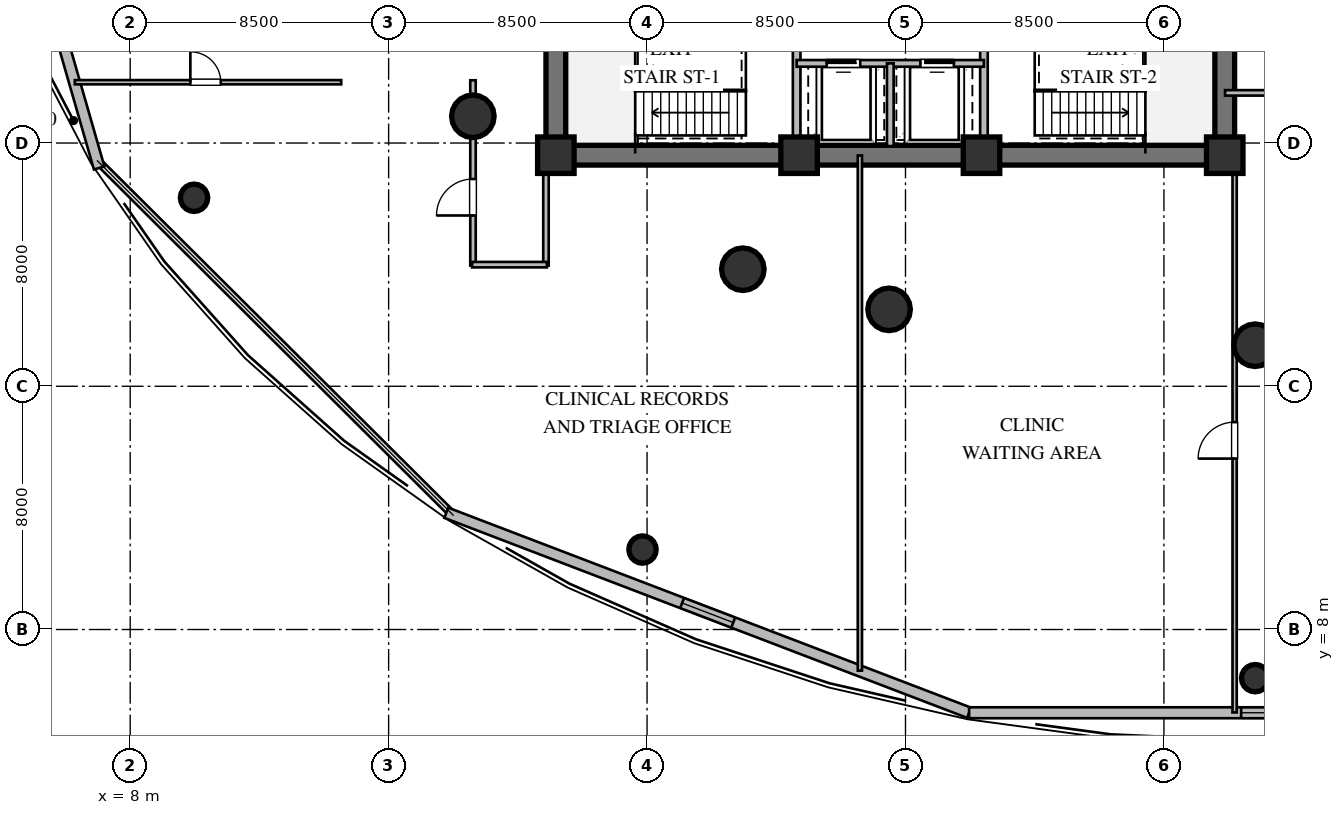
"""IFC4 building model, lengths in metres.
Left out: names, types, materials, properties, quantities, classifications, styles, units other than length and angle.
Written with IfcOpenShell. Run it as: python <this file> out.ifc"""

import sys

from ifc_helpers import new_model, si_unit, direction, frame, frame_2d, origin, origin_2d, place, context, subcontext, project, spatial, rectangle, circle, extrude, element, fill, save


model = new_model("IFC4")
c1 = context("Model", 3, precision=1e-05, world=origin(), true_north=direction((0.0, 1.0)))
c2 = subcontext(c1, "Body", "Model", "MODEL_VIEW")
j1 = project(units=[si_unit("LENGTHUNIT", "METRE"), si_unit("PLANEANGLEUNIT", "RADIAN")], contexts=[c1])
p1 = place(None, origin())
s1 = spatial("IfcSite", under=j1, at=p1, CompositionType="ELEMENT")
p2 = place(p1, origin())
s2 = spatial("IfcBuilding", under=s1, at=p2, CompositionType="ELEMENT")
p3 = place(p2, frame((0.0, 0.0, 9.6)))
s3 = spatial("IfcBuildingStorey", under=s2, at=p3, CompositionType="ELEMENT", Elevation=9.6)
p4 = place(p3, frame((21.675, 23.6, 0.0), z_axis=(0.0, 0.0, 1.0), x_axis=(1.0, 0.0, 0.0)))
e1 = element("IfcWall", 1, at=p4, inside=s3, PredefinedType="SHEAR", context=c2, shape_type="SweptSolid", body=[
    extrude(rectangle(XDim=22.65, YDim=0.65, at=frame_2d((11.325, 0.0))), origin(), (0.0, 0.0, 1.0), 4.52),
])
p5 = place(p3, frame((22.0, 23.925, 0.0), z_axis=(0.0, 0.0, 1.0), x_axis=(0.0, 1.0, 0.0)))
e2 = element("IfcWall", 2, at=p5, inside=s3, PredefinedType="SHEAR", context=c2, shape_type="SweptSolid", body=[
    extrude(rectangle(XDim=12.15, YDim=0.65, at=frame_2d((6.075, 0.0))), origin(), (0.0, 0.0, 1.0), 4.52),
])
p6 = place(p3, frame((44.0, 23.925, 0.0), z_axis=(0.0, 0.0, 1.0), x_axis=(0.0, 1.0, 0.0)))
e3 = element("IfcWall", 3, at=p6, inside=s3, PredefinedType="SHEAR", context=c2, shape_type="SweptSolid", body=[
    extrude(rectangle(XDim=12.15, YDim=0.65, at=frame_2d((6.075, 0.0))), origin(), (0.0, 0.0, 1.0), 4.52),
])
p7 = place(p6, frame((8.775, 0.0, 0.0)))
e4 = element("IfcOpeningElement", 4, at=p7, cuts=e3, PredefinedType="OPENING", context=c2, shape_type="SweptSolid", body=[
    extrude(rectangle(XDim=1.5, YDim=2.15, at=frame_2d((0.75, 1.075))), frame((0.0, 0.335, 0.0), z_axis=(0.0, -1.0, 0.0), x_axis=(1.0, 0.0, 0.0)), (0.0, 0.0, 1.0), 0.67),
])
for number, where, z_axis, x_axis in (
    (5, (22.0, 23.6, 0.0), (0.0, 0.0, 1.0), (1.0, 0.0, 0.0)),
    (6, (30.0, 23.6, 0.0), (0.0, 0.0, 1.0), (1.0, 0.0, 0.0)),
    (7, (36.0, 23.6, 0.0), (0.0, 0.0, 1.0), (1.0, 0.0, 0.0)),
    (8, (44.0, 23.6, 0.0), (0.0, 0.0, 1.0), (1.0, 0.0, 0.0)),
):
    element("IfcColumn", number, at=place(p3, frame(where, z_axis=z_axis, x_axis=x_axis)), inside=s3, PredefinedType="COLUMN", context=c2, shape_type="SweptSolid", body=[
        extrude(rectangle(XDim=1.2, YDim=1.2, at=origin_2d()), origin(), (0.0, 0.0, 1.0), 4.8),
    ])
for number, where, z_axis, x_axis in (
    (9, (19.27, 24.88, 0.0), (0.0, 0.0, 1.0), (1.0, 0.0, 0.0)),
    (10, (28.15, 19.85, 0.0), (0.0, 0.0, 1.0), (1.0, 0.0, 0.0)),
    (11, (32.96, 18.53, 0.0), (0.0, 0.0, 1.0), (1.0, 0.0, 0.0)),
    (12, (45.0, 17.35, 0.0), (0.0, 0.0, 1.0), (1.0, 0.0, 0.0)),
):
    element("IfcColumn", number, at=place(p3, frame(where, z_axis=z_axis, x_axis=x_axis)), inside=s3, PredefinedType="COLUMN", context=c2, shape_type="SweptSolid", body=[
        extrude(circle(Radius=0.7, at=origin_2d()), origin(), (0.0, 0.0, 1.0), 4.8),
    ])
for number, where, z_axis, x_axis in (
    (13, (10.1, 22.2, 0.0), (0.0, 0.0, 1.0), (1.0, 0.0, 0.0)),
    (14, (24.85, 10.63, 0.0), (0.0, 0.0, 1.0), (1.0, 0.0, 0.0)),
    (15, (45.0, 6.4, 0.0), (0.0, 0.0, 1.0), (1.0, 0.0, 0.0)),
):
    element("IfcColumn", number, at=place(p3, frame(where, z_axis=z_axis, x_axis=x_axis)), inside=s3, PredefinedType="COLUMN", context=c2, shape_type="SweptSolid", body=[
        extrude(circle(Radius=0.45, at=origin_2d()), origin(), (0.0, 0.0, 1.0), 4.8),
    ])
p8 = place(p3, frame((2.72, 38.0, 0.0), z_axis=(0.0, 0.0, 1.0), x_axis=(0.276203409751, -0.961099202186, 0.0)))
e16 = element("IfcWall", 16, at=p8, inside=s3, PredefinedType="STANDARD", context=c2, shape_type="SweptSolid", body=[
    extrude(rectangle(XDim=15.42, YDim=0.36, at=frame_2d((7.71, 0.0))), origin(), (0.0, 0.0, 1.0), 4.52),
])
p9 = place(p8, frame((6.81, 0.0, 1.05)))
e17 = element("IfcOpeningElement", 17, at=p9, cuts=e16, PredefinedType="OPENING", context=c2, shape_type="SweptSolid", body=[
    extrude(rectangle(XDim=1.8, YDim=1.7, at=frame_2d((0.9, 0.85))), frame((0.0, 0.19, 0.0), z_axis=(0.0, -1.0, 0.0), x_axis=(1.0, 0.0, 0.0)), (0.0, 0.0, 1.0), 0.38),
])
p10 = place(p3, frame((18.396, 11.839, 0.0), z_axis=(0.0, 0.0, 1.0), x_axis=(0.934012147289, -0.357241247221, 0.0)))
e18 = element("IfcWall", 18, at=p10, inside=s3, PredefinedType="STANDARD", context=c2, shape_type="SweptSolid", body=[
    extrude(rectangle(XDim=18.411, YDim=0.36, at=frame_2d((9.206, 0.0))), origin(), (0.0, 0.0, 1.0), 4.52),
])
p11 = place(p10, frame((8.305, 0.0, 1.05)))
e19 = element("IfcOpeningElement", 19, at=p11, cuts=e18, PredefinedType="OPENING", context=c2, shape_type="SweptSolid", body=[
    extrude(rectangle(XDim=1.8, YDim=1.7, at=frame_2d((0.9, 0.85))), frame((0.0, 0.19, 0.0), z_axis=(0.0, -1.0, 0.0), x_axis=(1.0, 0.0, 0.0)), (0.0, 0.0, 1.0), 0.38),
])
p12 = place(p3, frame((35.592, 5.262, 0.0), z_axis=(0.0, 0.0, 1.0), x_axis=(1.0, 0.0, 0.0)))
e20 = element("IfcWall", 20, at=p12, inside=s3, PredefinedType="STANDARD", context=c2, shape_type="SweptSolid", body=[
    extrude(rectangle(XDim=18.816, YDim=0.36, at=frame_2d((9.408, 0.0))), origin(), (0.0, 0.0, 1.0), 4.52),
])
p13 = place(p12, frame((8.948, 0.0, 1.05)))
e21 = element("IfcOpeningElement", 21, at=p13, cuts=e20, PredefinedType="OPENING", context=c2, shape_type="SweptSolid", body=[
    extrude(rectangle(XDim=1.8, YDim=1.7, at=frame_2d((0.9, 0.85))), frame((0.0, 0.19, 0.0), z_axis=(0.0, -1.0, 0.0), x_axis=(1.0, 0.0, 0.0)), (0.0, 0.0, 1.0), 0.38),
])
p14 = place(p3, frame((29.92, 23.9, 0.0), z_axis=(0.0, 0.0, 1.0), x_axis=(0.0, 1.0, 0.0)))
e22 = element("IfcWall", 22, at=p14, inside=s3, PredefinedType="SOLIDWALL", context=c2, shape_type="SweptSolid", body=[
    extrude(rectangle(XDim=5.4, YDim=0.25, at=frame_2d((2.7, 0.0))), origin(), (0.0, 0.0, 1.0), 4.52),
])
p15 = place(p14, frame((3.421, 0.0, 0.0)))
e23 = element("IfcOpeningElement", 23, at=p15, cuts=e22, PredefinedType="OPENING", context=c2, shape_type="SweptSolid", body=[
    extrude(rectangle(XDim=1.15, YDim=2.1, at=frame_2d((0.575, 1.05))), frame((0.0, 0.135, 0.0), z_axis=(0.0, -1.0, 0.0), x_axis=(1.0, 0.0, 0.0)), (0.0, 0.0, 1.0), 0.27),
])
p16 = place(p3, frame((36.08, 23.9, 0.0), z_axis=(0.0, 0.0, 1.0), x_axis=(0.0, 1.0, 0.0)))
e24 = element("IfcWall", 24, at=p16, inside=s3, PredefinedType="SOLIDWALL", context=c2, shape_type="SweptSolid", body=[
    extrude(rectangle(XDim=5.4, YDim=0.25, at=frame_2d((2.7, 0.0))), origin(), (0.0, 0.0, 1.0), 4.52),
])
p17 = place(p16, frame((3.421, 0.0, 0.0)))
e25 = element("IfcOpeningElement", 25, at=p17, cuts=e24, PredefinedType="OPENING", context=c2, shape_type="SweptSolid", body=[
    extrude(rectangle(XDim=1.15, YDim=2.1, at=frame_2d((0.575, 1.05))), frame((0.0, 0.135, 0.0), z_axis=(0.0, -1.0, 0.0), x_axis=(1.0, 0.0, 0.0)), (0.0, 0.0, 1.0), 0.27),
])
p18 = place(p3, frame((29.92, 26.62, 0.0), z_axis=(0.0, 0.0, 1.0), x_axis=(1.0, 0.0, 0.0)))
e26 = element("IfcWall", 26, at=p18, inside=s3, PredefinedType="SOLIDWALL", context=c2, shape_type="SweptSolid", body=[
    extrude(rectangle(XDim=6.16, YDim=0.22, at=frame_2d((3.08, 0.0))), origin(), (0.0, 0.0, 1.0), 4.52),
])
p19 = place(p18, frame((0.99, 0.0, 0.0)))
e27 = element("IfcOpeningElement", 27, at=p19, cuts=e26, PredefinedType="OPENING", context=c2, shape_type="SweptSolid", body=[
    extrude(rectangle(XDim=1.1, YDim=2.1, at=frame_2d((0.55, 1.05))), frame((0.0, 0.12, 0.0), z_axis=(0.0, -1.0, 0.0), x_axis=(1.0, 0.0, 0.0)), (0.0, 0.0, 1.0), 0.24),
])
p20 = place(p18, frame((4.07, 0.0, 0.0)))
e28 = element("IfcOpeningElement", 28, at=p20, cuts=e26, PredefinedType="OPENING", context=c2, shape_type="SweptSolid", body=[
    extrude(rectangle(XDim=1.1, YDim=2.1, at=frame_2d((0.55, 1.05))), frame((0.0, 0.12, 0.0), z_axis=(0.0, -1.0, 0.0), x_axis=(1.0, 0.0, 0.0)), (0.0, 0.0, 1.0), 0.24),
])
p21 = place(p3, frame((33.0, 23.9, 0.0), z_axis=(0.0, 0.0, 1.0), x_axis=(0.0, 1.0, 0.0)))
e29 = element("IfcWall", 29, at=p21, inside=s3, PredefinedType="SOLIDWALL", context=c2, shape_type="SweptSolid", body=[
    extrude(rectangle(XDim=2.72, YDim=0.22, at=frame_2d((1.36, 0.0))), origin(), (0.0, 0.0, 1.0), 4.52),
])
p22 = place(p3, frame((62.415, 25.65, 0.0), z_axis=(0.0, 0.0, 1.0), x_axis=(-1.0, 0.0, 0.0)))
e30 = element("IfcWall", 30, at=p22, inside=s3, PredefinedType="PARTITIONING", context=c2, shape_type="SweptSolid", body=[
    extrude(rectangle(XDim=18.405, YDim=0.18, at=frame_2d((9.203, 0.0))), origin(), (0.0, 0.0, 1.0), 3.966),
])
p23 = place(p22, frame((8.46, 0.0, 0.0)))
e31 = element("IfcOpeningElement", 31, at=p23, cuts=e30, PredefinedType="OPENING", context=c2, shape_type="SweptSolid", body=[
    extrude(rectangle(XDim=1.2, YDim=2.15, at=frame_2d((0.6, 1.075))), frame((0.0, 0.1, 0.0), z_axis=(0.0, -1.0, 0.0), x_axis=(1.0, 0.0, 0.0)), (0.0, 0.0, 1.0), 0.2),
])
p24 = place(p3, frame((19.275, 19.97, 0.0), z_axis=(0.0, 0.0, 1.0), x_axis=(0.0, 1.0, 0.0)))
e32 = element("IfcWall", 32, at=p24, inside=s3, PredefinedType="PARTITIONING", context=c2, shape_type="SweptSolid", body=[
    extrude(rectangle(XDim=6.095, YDim=0.18, at=frame_2d((3.047, 0.0))), origin(), (0.0, 0.0, 1.0), 3.898),
])
p25 = place(p24, frame((1.647, 0.0, 0.0)))
e33 = element("IfcOpeningElement", 33, at=p25, cuts=e32, PredefinedType="OPENING", context=c2, shape_type="SweptSolid", body=[
    extrude(rectangle(XDim=1.2, YDim=2.15, at=frame_2d((0.6, 1.075))), frame((0.0, 0.1, 0.0), z_axis=(0.0, -1.0, 0.0), x_axis=(1.0, 0.0, 0.0)), (0.0, 0.0, 1.0), 0.2),
])
p26 = place(p3, frame((21.675, 23.59, 0.0), z_axis=(0.0, 0.0, 1.0), x_axis=(0.0, -1.0, 0.0)))
e34 = element("IfcWall", 34, at=p26, inside=s3, PredefinedType="PARTITIONING", context=c2, shape_type="SweptSolid", body=[
    extrude(rectangle(XDim=3.62, YDim=0.18, at=frame_2d((1.81, 0.0))), origin(), (0.0, 0.0, 1.0), 3.66),
])
p27 = place(p3, frame((21.705, 20.0, 0.0), z_axis=(0.0, 0.0, 1.0), x_axis=(-1.0, 0.0, 0.0)))
e35 = element("IfcWall", 35, at=p27, inside=s3, PredefinedType="PARTITIONING", context=c2, shape_type="SweptSolid", body=[
    extrude(rectangle(XDim=2.46, YDim=0.18, at=frame_2d((1.23, 0.0))), origin(), (0.0, 0.0, 1.0), 4.52),
])
p28 = place(p3, frame((44.325, 5.272, 0.0), z_axis=(0.0, 0.0, 1.0), x_axis=(0.0, 1.0, 0.0)))
e36 = element("IfcWall", 36, at=p28, inside=s3, PredefinedType="PARTITIONING", context=c2, shape_type="SweptSolid", body=[
    extrude(rectangle(XDim=18.318, YDim=0.14, at=frame_2d((9.159, 0.0))), origin(), (0.0, 0.0, 1.0), 3.66),
])
p29 = place(p28, frame((8.349, 0.0, 0.0)))
e37 = element("IfcOpeningElement", 37, at=p29, cuts=e36, PredefinedType="OPENING", context=c2, shape_type="SweptSolid", body=[
    extrude(rectangle(XDim=1.2, YDim=2.15, at=frame_2d((0.6, 1.075))), frame((0.0, 0.08, 0.0), z_axis=(0.0, -1.0, 0.0), x_axis=(1.0, 0.0, 0.0)), (0.0, 0.0, 1.0), 0.16),
])
p30 = place(p3, frame((6.179, 26.0, 0.0), z_axis=(0.0, 0.0, 1.0), x_axis=(1.0, 0.0, 0.0)))
e38 = element("IfcWall", 38, at=p30, inside=s3, PredefinedType="PARTITIONING", context=c2, shape_type="SweptSolid", body=[
    extrude(rectangle(XDim=8.761, YDim=0.14, at=frame_2d((4.381, 0.0))), origin(), (0.0, 0.0, 1.0), 4.52),
])
p31 = place(p30, frame((3.8, 0.0, 0.0)))
e39 = element("IfcOpeningElement", 39, at=p31, cuts=e38, PredefinedType="OPENING", context=c2, shape_type="SweptSolid", body=[
    extrude(rectangle(XDim=1.0, YDim=2.1, at=frame_2d((0.5, 1.05))), frame((0.0, 0.08, 0.0), z_axis=(0.0, -1.0, 0.0), x_axis=(1.0, 0.0, 0.0)), (0.0, 0.0, 1.0), 0.16),
])
p32 = place(p3, frame((32.0, 23.59, 0.0), z_axis=(0.0, 0.0, 1.0), x_axis=(0.0, -1.0, 0.0)))
e40 = element("IfcWall", 40, at=p32, inside=s3, PredefinedType="PARTITIONING", context=c2, shape_type="SweptSolid", body=[
    extrude(rectangle(XDim=16.944, YDim=0.14, at=frame_2d((8.472, 0.0))), origin(), (0.0, 0.0, 1.0), 4.52),
])
p33 = place(p11, origin())
e41 = element("IfcWindow", 41, at=p33, inside=s3, PartitioningType="SINGLE_PANEL", PredefinedType="WINDOW", context=c2, shape_type="SweptSolid", body=[
    extrude(rectangle(XDim=1.8, YDim=1.7, at=frame_2d((0.9, 0.85))), frame((0.0, 0.03, 0.0), z_axis=(0.0, -1.0, 0.0), x_axis=(1.0, 0.0, 0.0)), (0.0, 0.0, 1.0), 0.06),
])
fill(e19, e41)
p34 = place(p13, origin())
e42 = element("IfcWindow", 42, at=p34, inside=s3, PartitioningType="SINGLE_PANEL", PredefinedType="WINDOW", context=c2, shape_type="SweptSolid", body=[
    extrude(rectangle(XDim=1.8, YDim=1.7, at=frame_2d((0.9, 0.85))), frame((0.0, 0.03, 0.0), z_axis=(0.0, -1.0, 0.0), x_axis=(1.0, 0.0, 0.0)), (0.0, 0.0, 1.0), 0.06),
])
fill(e21, e42)
p35 = place(p19, origin())
e43 = element("IfcDoor", 43, at=p35, inside=s3, OperationType="SLIDING_TO_LEFT", PredefinedType="DOOR", context=c2, shape_type="SweptSolid", body=[
    extrude(rectangle(XDim=1.1, YDim=2.1, at=frame_2d((0.55, 1.05))), frame((0.0, 0.025, 0.0), z_axis=(0.0, -1.0, 0.0), x_axis=(1.0, 0.0, 0.0)), (0.0, 0.0, 1.0), 0.05),
])
fill(e27, e43)
p36 = place(p20, origin())
e44 = element("IfcDoor", 44, at=p36, inside=s3, OperationType="SLIDING_TO_RIGHT", PredefinedType="DOOR", context=c2, shape_type="SweptSolid", body=[
    extrude(rectangle(XDim=1.1, YDim=2.1, at=frame_2d((0.55, 1.05))), frame((0.0, 0.025, 0.0), z_axis=(0.0, -1.0, 0.0), x_axis=(1.0, 0.0, 0.0)), (0.0, 0.0, 1.0), 0.05),
])
fill(e28, e44)
p37 = place(p25, origin())
e45 = element("IfcDoor", 45, at=p37, inside=s3, OperationType="SINGLE_SWING_LEFT", PredefinedType="DOOR", context=c2, shape_type="SweptSolid", body=[
    extrude(rectangle(XDim=1.2, YDim=2.15, at=frame_2d((0.6, 1.075))), frame((0.0, 0.025, 0.0), z_axis=(0.0, -1.0, 0.0), x_axis=(1.0, 0.0, 0.0)), (0.0, 0.0, 1.0), 0.05),
])
fill(e33, e45)
p38 = place(p29, origin())
e46 = element("IfcDoor", 46, at=p38, inside=s3, OperationType="SINGLE_SWING_LEFT", PredefinedType="DOOR", context=c2, shape_type="SweptSolid", body=[
    extrude(rectangle(XDim=1.2, YDim=2.15, at=frame_2d((0.6, 1.075))), frame((0.0, 0.025, 0.0), z_axis=(0.0, -1.0, 0.0), x_axis=(1.0, 0.0, 0.0)), (0.0, 0.0, 1.0), 0.05),
])
fill(e37, e46)
p39 = place(p31, origin())
e47 = element("IfcDoor", 47, at=p39, inside=s3, OperationType="SINGLE_SWING_LEFT", PredefinedType="DOOR", context=c2, shape_type="SweptSolid", body=[
    extrude(rectangle(XDim=1.0, YDim=2.1, at=frame_2d((0.5, 1.05))), frame((0.0, 0.025, 0.0), z_axis=(0.0, -1.0, 0.0), x_axis=(1.0, 0.0, 0.0)), (0.0, 0.0, 1.0), 0.05),
])
fill(e39, e47)
save(model, sys.argv[1])
